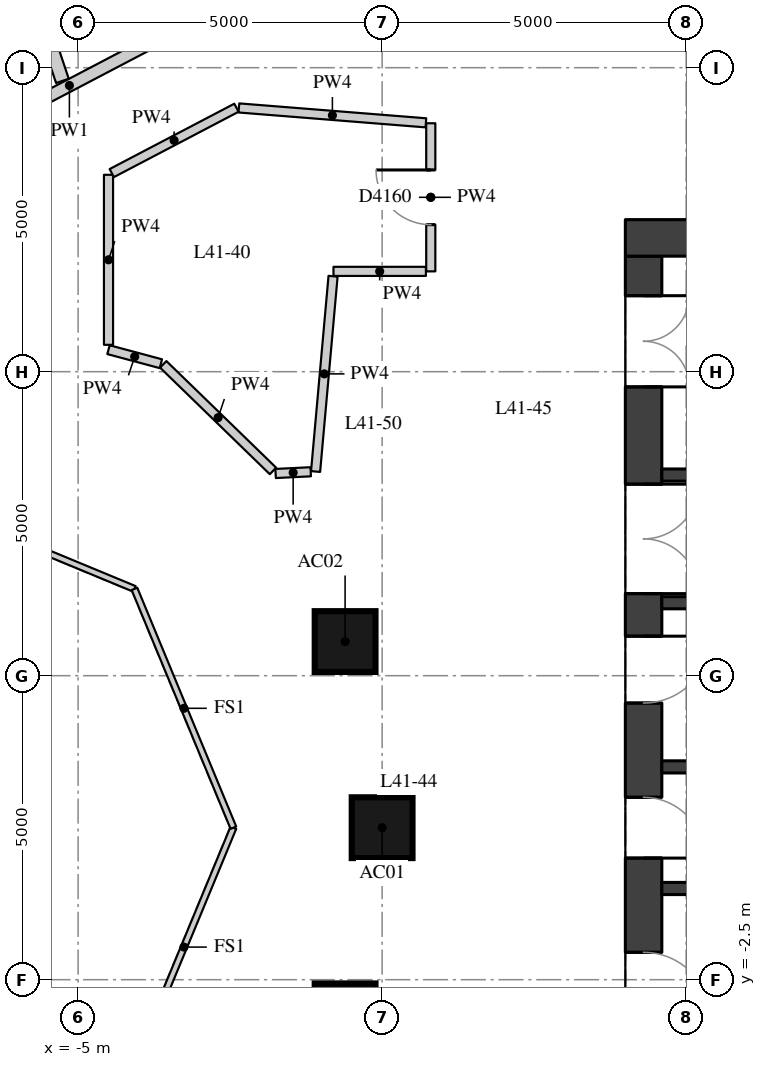
"""IFC4 building model, lengths in metres.
Left out: names, types, materials, properties, quantities, classifications, styles, units other than length and angle.
Written with IfcOpenShell. Run it as: python <this file> out.ifc"""

import sys

from ifc_helpers import new_model, si_unit, direction, frame, frame_2d, origin, origin_2d, place, context, subcontext, project, spatial, rectangle, extrude, element, fill, save


model = new_model("IFC4")
c1 = context("Model", 3, precision=1e-05, world=origin(), true_north=direction((0.0, 1.0)))
c2 = subcontext(c1, "Body", "Model", "MODEL_VIEW")
j1 = project(units=[si_unit("LENGTHUNIT", "METRE"), si_unit("PLANEANGLEUNIT", "RADIAN")], contexts=[c1])
p1 = place(None, origin())
s1 = spatial("IfcSite", under=j1, at=p1, CompositionType="ELEMENT")
p2 = place(p1, origin())
s2 = spatial("IfcBuilding", under=s1, at=p2, CompositionType="ELEMENT")
p3 = place(p2, frame((0.0, 0.0, 148.4)))
s3 = spatial("IfcBuildingStorey", under=s2, at=p3, CompositionType="ELEMENT", Elevation=148.4)
for number, where, z_axis, x_axis in (
    (1, (0.0, 0.0, 0.0), (0.0, 0.0, 1.0), (1.0, 0.0, 0.0)),
    (2, (-0.609, 3.062, 0.0), (0.0, 0.0, 1.0), (1.0, 0.0, 0.0)),
    (3, (-0.609, -3.062, 0.0), (0.0, 0.0, 1.0), (1.0, 0.0, 0.0)),
):
    element("IfcColumn", number, at=place(p3, frame(where, z_axis=z_axis, x_axis=x_axis)), inside=s3, PredefinedType="COLUMN", context=c2, shape_type="SweptSolid", body=[
        extrude(rectangle(XDim=1.0, YDim=1.0, at=origin_2d()), origin(), (0.0, 0.0, 1.0), 3.3),
    ])
p4 = place(p3, frame((4.3, -9.4, 0.0), z_axis=(0.0, 0.0, 1.0), x_axis=(0.0, 1.0, 0.0)))
e4 = element("IfcWall", 4, at=p4, inside=s3, PredefinedType="SHEAR", context=c2, shape_type="SweptSolid", body=[
    extrude(rectangle(XDim=18.8, YDim=0.6, at=frame_2d((9.4, 0.0))), origin(), (0.0, 0.0, 1.0), 3.02),
])
p5 = place(p4, frame((0.65, 0.0, 0.0)))
e5 = element("IfcOpeningElement", 5, at=p5, cuts=e4, PredefinedType="OPENING", context=c2, shape_type="SweptSolid", body=[
    extrude(rectangle(XDim=1.5, YDim=2.1, at=frame_2d((0.75, 1.05))), frame((0.0, 0.31, 0.0), z_axis=(0.0, -1.0, 0.0), x_axis=(1.0, 0.0, 0.0)), (0.0, 0.0, 1.0), 0.62),
])
p6 = place(p4, frame((3.75, 0.0, 0.0)))
e6 = element("IfcOpeningElement", 6, at=p6, cuts=e4, PredefinedType="OPENING", context=c2, shape_type="SweptSolid", body=[
    extrude(rectangle(XDim=1.8, YDim=2.1, at=frame_2d((0.9, 1.05))), frame((0.0, 0.31, 0.0), z_axis=(0.0, -1.0, 0.0), x_axis=(1.0, 0.0, 0.0)), (0.0, 0.0, 1.0), 0.62),
])
p7 = place(p4, frame((6.25, 0.0, 0.0)))
e7 = element("IfcOpeningElement", 7, at=p7, cuts=e4, PredefinedType="OPENING", context=c2, shape_type="SweptSolid", body=[
    extrude(rectangle(XDim=1.1, YDim=2.1, at=frame_2d((0.55, 1.05))), frame((0.0, 0.31, 0.0), z_axis=(0.0, -1.0, 0.0), x_axis=(1.0, 0.0, 0.0)), (0.0, 0.0, 1.0), 0.62),
])
p8 = place(p4, frame((8.9, 0.0, 0.0)))
e8 = element("IfcOpeningElement", 8, at=p8, cuts=e4, PredefinedType="OPENING", context=c2, shape_type="SweptSolid", body=[
    extrude(rectangle(XDim=1.0, YDim=2.1, at=frame_2d((0.5, 1.05))), frame((0.0, 0.31, 0.0), z_axis=(0.0, -1.0, 0.0), x_axis=(1.0, 0.0, 0.0)), (0.0, 0.0, 1.0), 0.62),
])
p9 = place(p4, frame((11.45, 0.0, 0.0)))
e9 = element("IfcOpeningElement", 9, at=p9, cuts=e4, PredefinedType="OPENING", context=c2, shape_type="SweptSolid", body=[
    extrude(rectangle(XDim=1.1, YDim=2.1, at=frame_2d((0.55, 1.05))), frame((0.0, 0.31, 0.0), z_axis=(0.0, -1.0, 0.0), x_axis=(1.0, 0.0, 0.0)), (0.0, 0.0, 1.0), 0.62),
])
p10 = place(p4, frame((13.25, 0.0, 0.0)))
e10 = element("IfcOpeningElement", 10, at=p10, cuts=e4, PredefinedType="OPENING", context=c2, shape_type="SweptSolid", body=[
    extrude(rectangle(XDim=1.8, YDim=2.1, at=frame_2d((0.9, 1.05))), frame((0.0, 0.31, 0.0), z_axis=(0.0, -1.0, 0.0), x_axis=(1.0, 0.0, 0.0)), (0.0, 0.0, 1.0), 0.62),
])
p11 = place(p4, frame((16.65, 0.0, 0.0)))
e11 = element("IfcOpeningElement", 11, at=p11, cuts=e4, PredefinedType="OPENING", context=c2, shape_type="SweptSolid", body=[
    extrude(rectangle(XDim=1.5, YDim=2.1, at=frame_2d((0.75, 1.05))), frame((0.0, 0.31, 0.0), z_axis=(0.0, -1.0, 0.0), x_axis=(1.0, 0.0, 0.0)), (0.0, 0.0, 1.0), 0.62),
])
p12 = place(p3, frame((4.0, 9.7, 0.0), z_axis=(0.0, 0.0, 1.0), x_axis=(1.0, 0.0, 0.0)))
e12 = element("IfcWall", 12, at=p12, inside=s3, PredefinedType="SHEAR", context=c2, shape_type="SweptSolid", body=[
    extrude(rectangle(XDim=12.0, YDim=0.6, at=frame_2d((6.0, 0.0))), origin(), (0.0, 0.0, 1.0), 3.02),
])
p13 = place(p3, frame((4.6, 5.8, 0.0), z_axis=(0.0, 0.0, 1.0), x_axis=(1.0, 0.0, 0.0)))
e13 = element("IfcWall", 13, at=p13, inside=s3, PredefinedType="SHEAR", context=c2, shape_type="SweptSolid", body=[
    extrude(rectangle(XDim=10.8, YDim=0.2, at=frame_2d((5.4, 0.0))), origin(), (0.0, 0.0, 1.0), 3.02),
])
p14 = place(p13, frame((7.05, 0.0, 0.0)))
e14 = element("IfcOpeningElement", 14, at=p14, cuts=e13, PredefinedType="OPENING", context=c2, shape_type="SweptSolid", body=[
    extrude(rectangle(XDim=1.1, YDim=2.1, at=frame_2d((0.55, 1.05))), frame((0.0, 0.11, 0.0), z_axis=(0.0, -1.0, 0.0), x_axis=(1.0, 0.0, 0.0)), (0.0, 0.0, 1.0), 0.22),
])
p15 = place(p13, frame((9.05, 0.0, 0.0)))
e15 = element("IfcOpeningElement", 15, at=p15, cuts=e13, PredefinedType="OPENING", context=c2, shape_type="SweptSolid", body=[
    extrude(rectangle(XDim=1.1, YDim=2.1, at=frame_2d((0.55, 1.05))), frame((0.0, 0.11, 0.0), z_axis=(0.0, -1.0, 0.0), x_axis=(1.0, 0.0, 0.0)), (0.0, 0.0, 1.0), 0.22),
])
p16 = place(p3, frame((4.6, 3.7, 0.0), z_axis=(0.0, 0.0, 1.0), x_axis=(1.0, 0.0, 0.0)))
e16 = element("IfcWall", 16, at=p16, inside=s3, PredefinedType="SHEAR", context=c2, shape_type="SweptSolid", body=[
    extrude(rectangle(XDim=10.8, YDim=0.2, at=frame_2d((5.4, 0.0))), origin(), (0.0, 0.0, 1.0), 3.02),
])
p17 = place(p16, frame((6.6, 0.0, 0.0)))
e17 = element("IfcOpeningElement", 17, at=p17, cuts=e16, PredefinedType="OPENING", context=c2, shape_type="SweptSolid", body=[
    extrude(rectangle(XDim=1.1, YDim=2.1, at=frame_2d((0.55, 1.05))), frame((0.0, 0.11, 0.0), z_axis=(0.0, -1.0, 0.0), x_axis=(1.0, 0.0, 0.0)), (0.0, 0.0, 1.0), 0.22),
])
p18 = place(p16, frame((8.9, 0.0, 0.0)))
e18 = element("IfcOpeningElement", 18, at=p18, cuts=e16, PredefinedType="OPENING", context=c2, shape_type="SweptSolid", body=[
    extrude(rectangle(XDim=1.1, YDim=2.1, at=frame_2d((0.55, 1.05))), frame((0.0, 0.11, 0.0), z_axis=(0.0, -1.0, 0.0), x_axis=(1.0, 0.0, 0.0)), (0.0, 0.0, 1.0), 0.22),
])
for number, where, z_axis, x_axis in (
    (19, (4.6, 1.0, 0.0), (0.0, 0.0, 1.0), (1.0, 0.0, 0.0)),
    (20, (4.6, -1.0, 0.0), (0.0, 0.0, 1.0), (1.0, 0.0, 0.0)),
):
    element("IfcWall", number, at=place(p3, frame(where, z_axis=z_axis, x_axis=x_axis)), inside=s3, PredefinedType="SHEAR", context=c2, shape_type="SweptSolid", body=[
        extrude(rectangle(XDim=10.8, YDim=0.2, at=frame_2d((5.4, 0.0))), origin(), (0.0, 0.0, 1.0), 3.02),
    ])
p19 = place(p3, frame((-7.557, 10.942, 0.0), z_axis=(0.0, 0.0, 1.0), x_axis=(0.885672830659, 0.464309850244, 0.0)))
e21 = element("IfcWall", 21, at=p19, inside=s3, PredefinedType="PARTITIONING", context=c2, shape_type="SweptSolid", body=[
    extrude(rectangle(XDim=5.452, YDim=0.2, at=frame_2d((2.726, 0.0))), origin(), (0.0, 0.0, 1.0), 3.02),
])
p20 = place(p3, frame((-2.669, 13.468, 0.0), z_axis=(0.0, 0.0, 1.0), x_axis=(0.996831622407, -0.079540659849, 0.0)))
e22 = element("IfcWall", 22, at=p20, inside=s3, PredefinedType="PARTITIONING", context=c2, shape_type="SweptSolid", body=[
    extrude(rectangle(XDim=8.349, YDim=0.2, at=frame_2d((4.174, 0.0))), origin(), (0.0, 0.0, 1.0), 3.02),
])
p21 = place(p20, frame((7.109, 0.0, 0.0)))
e23 = element("IfcOpeningElement", 23, at=p21, cuts=e22, PredefinedType="OPENING", context=c2, shape_type="SweptSolid", body=[
    extrude(rectangle(XDim=1.1, YDim=2.1, at=frame_2d((0.55, 1.05))), frame((0.0, 0.11, 0.0), z_axis=(0.0, -1.0, 0.0), x_axis=(1.0, 0.0, 0.0)), (0.0, 0.0, 1.0), 0.22),
])
p22 = place(p20, frame((1.775, 0.0, 0.0)))
e24 = element("IfcOpeningElement", 24, at=p22, cuts=e22, PredefinedType="OPENING", context=c2, shape_type="SweptSolid", body=[
    extrude(rectangle(XDim=1.8, YDim=2.1, at=frame_2d((0.9, 1.05))), frame((0.0, 0.11, 0.0), z_axis=(0.0, -1.0, 0.0), x_axis=(1.0, 0.0, 0.0)), (0.0, 0.0, 1.0), 0.22),
])
p23 = place(p3, frame((0.8, 11.586, 0.0), z_axis=(0.0, 0.0, 1.0), x_axis=(0.0, -1.0, 0.0)))
e25 = element("IfcWall", 25, at=p23, inside=s3, PredefinedType="PARTITIONING", context=c2, shape_type="SweptSolid", body=[
    extrude(rectangle(XDim=2.436, YDim=0.15, at=frame_2d((1.218, 0.0))), origin(), (0.0, 0.0, 1.0), 3.02),
])
p24 = place(p23, frame((0.768, 0.0, 0.0)))
e26 = element("IfcOpeningElement", 26, at=p24, cuts=e25, PredefinedType="OPENING", context=c2, shape_type="SweptSolid", body=[
    extrude(rectangle(XDim=0.9, YDim=2.1, at=frame_2d((0.45, 1.05))), frame((0.0, 0.085, 0.0), z_axis=(0.0, -1.0, 0.0), x_axis=(1.0, 0.0, 0.0)), (0.0, 0.0, 1.0), 0.17),
])
p25 = place(p3, frame((0.72, 9.15, 0.0), z_axis=(0.0, 0.0, 1.0), x_axis=(-1.0, 0.0, 0.0)))
e27 = element("IfcWall", 27, at=p25, inside=s3, PredefinedType="PARTITIONING", context=c2, shape_type="SweptSolid", body=[
    extrude(rectangle(XDim=1.52, YDim=0.15, at=frame_2d((0.76, 0.0))), origin(), (0.0, 0.0, 1.0), 3.02),
])
p26 = place(p3, frame((-0.807, 9.07, 0.0), z_axis=(0.0, 0.0, 1.0), x_axis=(-0.089184087733, -0.996015159772, 0.0)))
e28 = element("IfcWall", 28, at=p26, inside=s3, PredefinedType="PARTITIONING", context=c2, shape_type="SweptSolid", body=[
    extrude(rectangle(XDim=3.225, YDim=0.15, at=frame_2d((1.612, 0.0))), origin(), (0.0, 0.0, 1.0), 3.02),
])
p27 = place(p3, frame((-1.175, 5.854, 0.0), z_axis=(0.0, 0.0, 1.0), x_axis=(-0.998798267986, -0.049010405705, 0.0)))
e29 = element("IfcWall", 29, at=p27, inside=s3, PredefinedType="PARTITIONING", context=c2, shape_type="SweptSolid", body=[
    extrude(rectangle(XDim=0.578, YDim=0.15, at=frame_2d((0.289, 0.0))), origin(), (0.0, 0.0, 1.0), 3.02),
])
p28 = place(p3, frame((-1.795, 5.867, 0.0), z_axis=(0.0, 0.0, 1.0), x_axis=(-0.717315398231, 0.696748605639, 0.0)))
e30 = element("IfcWall", 30, at=p28, inside=s3, PredefinedType="PARTITIONING", context=c2, shape_type="SweptSolid", body=[
    extrude(rectangle(XDim=2.517, YDim=0.15, at=frame_2d((1.258, 0.0))), origin(), (0.0, 0.0, 1.0), 3.02),
])
p29 = place(p3, frame((-3.639, 7.631, 0.0), z_axis=(0.0, 0.0, 1.0), x_axis=(-0.965879594242, 0.258991523853, 0.0)))
e31 = element("IfcWall", 31, at=p29, inside=s3, PredefinedType="PARTITIONING", context=c2, shape_type="SweptSolid", body=[
    extrude(rectangle(XDim=0.892, YDim=0.15, at=frame_2d((0.446, 0.0))), origin(), (0.0, 0.0, 1.0), 3.02),
])
p30 = place(p3, frame((-4.5, 7.942, 0.0), z_axis=(0.0, 0.0, 1.0), x_axis=(0.0, 1.0, 0.0)))
e32 = element("IfcWall", 32, at=p30, inside=s3, PredefinedType="PARTITIONING", context=c2, shape_type="SweptSolid", body=[
    extrude(rectangle(XDim=2.796, YDim=0.15, at=frame_2d((1.398, 0.0))), origin(), (0.0, 0.0, 1.0), 3.02),
])
p31 = place(p3, frame((-4.447, 10.766, 0.0), z_axis=(0.0, 0.0, 1.0), x_axis=(0.885701482048, 0.464255193507, 0.0)))
e33 = element("IfcWall", 33, at=p31, inside=s3, PredefinedType="PARTITIONING", context=c2, shape_type="SweptSolid", body=[
    extrude(rectangle(XDim=2.315, YDim=0.15, at=frame_2d((1.158, 0.0))), origin(), (0.0, 0.0, 1.0), 3.02),
])
p32 = place(p3, frame((-2.356, 11.838, 0.0), z_axis=(0.0, 0.0, 1.0), x_axis=(0.996845649151, -0.079364675829, 0.0)))
e34 = element("IfcWall", 34, at=p32, inside=s3, PredefinedType="PARTITIONING", context=c2, shape_type="SweptSolid", body=[
    extrude(rectangle(XDim=3.085, YDim=0.15, at=frame_2d((1.543, 0.0))), origin(), (0.0, 0.0, 1.0), 3.02),
])
p33 = place(p3, frame((-7.683, 19.545, 0.0), z_axis=(0.0, 0.0, 1.0), x_axis=(0.316706037399, -0.94852374028, 0.0)))
e35 = element("IfcWall", 35, at=p33, inside=s3, PredefinedType="PARTITIONING", context=c2, shape_type="SweptSolid", body=[
    extrude(rectangle(XDim=7.656, YDim=0.22, at=frame_2d((3.828, 0.0))), origin(), (0.0, 0.0, 1.0), 3.02),
])
for number, where, z_axis, x_axis in (
    (36, (-2.446, 0.0, 0.0), (0.0, 0.0, 1.0), (-0.383, -0.924, 0.0)),
    (37, (-8.0, 5.554, 0.0), (0.0, 0.0, 1.0), (0.924, -0.383, 0.0)),
    (38, (-4.073, 3.927, 0.0), (0.0, 0.0, 1.0), (0.383, -0.924, 0.0)),
):
    element("IfcWall", number, at=place(p3, frame(where, z_axis=z_axis, x_axis=x_axis)), inside=s3, PredefinedType="PARTITIONING", context=c2, shape_type="SweptSolid", body=[
        extrude(rectangle(XDim=4.251, YDim=0.1, at=frame_2d((2.125, 0.0))), origin(), (0.0, 0.0, 1.0), 3.02),
    ])
p34 = place(p7, origin())
e39 = element("IfcDoor", 39, at=p34, inside=s3, OperationType="SINGLE_SWING_RIGHT", PredefinedType="DOOR", context=c2, shape_type="SweptSolid", body=[
    extrude(rectangle(XDim=1.1, YDim=2.1, at=frame_2d((0.55, 1.05))), frame((0.0, 0.025, 0.0), z_axis=(0.0, -1.0, 0.0), x_axis=(1.0, 0.0, 0.0)), (0.0, 0.0, 1.0), 0.05),
])
fill(e7, e39)
p35 = place(p8, origin())
e40 = element("IfcDoor", 40, at=p35, inside=s3, OperationType="SINGLE_SWING_RIGHT", PredefinedType="DOOR", context=c2, shape_type="SweptSolid", body=[
    extrude(rectangle(XDim=1.0, YDim=2.1, at=frame_2d((0.5, 1.05))), frame((0.0, 0.025, 0.0), z_axis=(0.0, -1.0, 0.0), x_axis=(1.0, 0.0, 0.0)), (0.0, 0.0, 1.0), 0.05),
])
fill(e8, e40)
p36 = place(p9, origin())
e41 = element("IfcDoor", 41, at=p36, inside=s3, OperationType="SINGLE_SWING_LEFT", PredefinedType="DOOR", context=c2, shape_type="SweptSolid", body=[
    extrude(rectangle(XDim=1.1, YDim=2.1, at=frame_2d((0.55, 1.05))), frame((0.0, 0.025, 0.0), z_axis=(0.0, -1.0, 0.0), x_axis=(1.0, 0.0, 0.0)), (0.0, 0.0, 1.0), 0.05),
])
fill(e9, e41)
p37 = place(p10, origin())
e42 = element("IfcDoor", 42, at=p37, inside=s3, OperationType="DOUBLE_DOOR_SINGLE_SWING", PredefinedType="DOOR", context=c2, shape_type="SweptSolid", body=[
    extrude(rectangle(XDim=1.8, YDim=2.1, at=frame_2d((0.9, 1.05))), frame((0.0, 0.025, 0.0), z_axis=(0.0, -1.0, 0.0), x_axis=(1.0, 0.0, 0.0)), (0.0, 0.0, 1.0), 0.05),
])
fill(e10, e42)
p38 = place(p11, origin())
e43 = element("IfcDoor", 43, at=p38, inside=s3, OperationType="DOUBLE_DOOR_SINGLE_SWING", PredefinedType="DOOR", context=c2, shape_type="SweptSolid", body=[
    extrude(rectangle(XDim=1.5, YDim=2.1, at=frame_2d((0.75, 1.05))), frame((0.0, 0.025, 0.0), z_axis=(0.0, -1.0, 0.0), x_axis=(1.0, 0.0, 0.0)), (0.0, 0.0, 1.0), 0.05),
])
fill(e11, e43)
p39 = place(p24, origin())
e44 = element("IfcDoor", 44, at=p39, inside=s3, OperationType="SINGLE_SWING_RIGHT", PredefinedType="DOOR", context=c2, shape_type="SweptSolid", body=[
    extrude(rectangle(XDim=0.9, YDim=2.1, at=frame_2d((0.45, 1.05))), frame((0.0, 0.025, 0.0), z_axis=(0.0, -1.0, 0.0), x_axis=(1.0, 0.0, 0.0)), (0.0, 0.0, 1.0), 0.05),
])
fill(e26, e44)
save(model, sys.argv[1])
